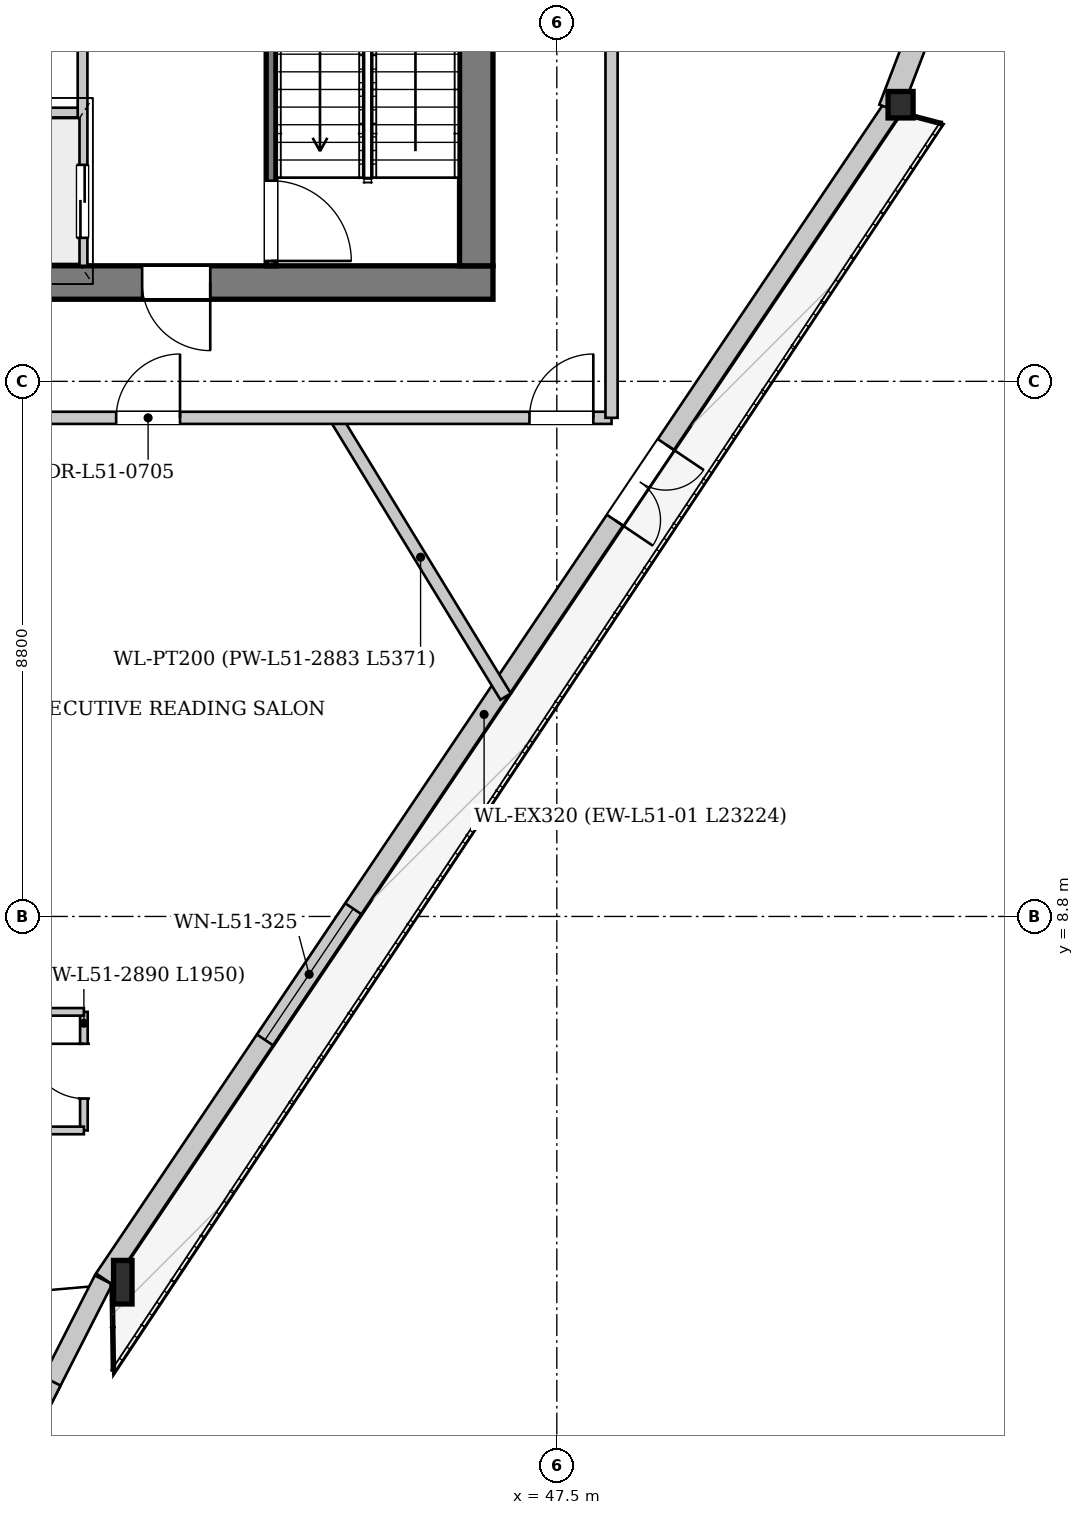
"""IFC4 building model, lengths in metres.
Left out: names, types, materials, properties, quantities, classifications, styles, units other than length and angle.
Written with IfcOpenShell. Run it as: python <this file> out.ifc"""

import sys

from ifc_helpers import new_model, si_unit, direction, frame, frame_2d, origin, origin_2d, place, context, subcontext, project, spatial, rectangle, i_section, extrude, source, transform, mapped, element, fill, save


model = new_model("IFC4")
c1 = context("Model", 3, precision=1e-05, world=origin(), true_north=direction((0.0, 1.0)))
c2 = subcontext(c1, "Body", "Model", "MODEL_VIEW")
j1 = project(units=[si_unit("LENGTHUNIT", "METRE"), si_unit("PLANEANGLEUNIT", "RADIAN")], contexts=[c1])
p1 = place(None, origin())
s1 = spatial("IfcSite", under=j1, at=p1, CompositionType="ELEMENT")
p2 = place(p1, origin())
s2 = spatial("IfcBuilding", under=s1, at=p2, CompositionType="ELEMENT")
p3 = place(p2, frame((0.0, 0.0, 192.75)))
s3 = spatial("IfcBuildingStorey", under=s2, at=p3, CompositionType="ELEMENT", Elevation=192.75)
m1 = source(origin(), c2, "Body", "SweptSolid", [
    extrude(i_section(OverallWidth=0.304, OverallDepth=0.716, WebThickness=0.021, FlangeThickness=0.04, at=origin_2d()), origin(), (0.0, 0.0, 1.0), 3.404),
])
p4 = place(p3, frame((40.186, 2.751, 0.0), z_axis=(0.10306941783, 0.020011390101, 0.994472844966), x_axis=(-0.190595380808, 0.981668681794, 0.0)))
e1 = element("IfcColumn", 1, at=p4, inside=s3, PredefinedType="COLUMN", context=c2, shape_type="MappedRepresentation", body=[
    mapped(m1, transform((0.0, 0.0, 0.0), x_axis=(1.0, 0.0, 0.0), y_axis=(0.0, 1.0, 0.0), z_axis=(0.0, 0.0, 1.0), scale=1.0)),
])
m2 = source(origin(), c2, "Body", "SweptSolid", [
    extrude(i_section(OverallWidth=0.412, OverallDepth=0.435, WebThickness=0.031, FlangeThickness=0.05, at=origin_2d()), origin(), (0.0, 0.0, 1.0), 3.396),
])
p5 = place(p3, frame((53.158, 22.014, 0.0), z_axis=(-0.002875831561, 0.079444846862, 0.9968351147), x_axis=(-0.999345455963, -0.036175401121, 0.0)))
e2 = element("IfcColumn", 2, at=p5, inside=s3, PredefinedType="COLUMN", context=c2, shape_type="MappedRepresentation", body=[
    mapped(m2, transform((0.0, 0.0, 0.0), x_axis=(1.0, 0.0, 0.0), y_axis=(0.0, 1.0, 0.0), z_axis=(0.0, 0.0, 1.0), scale=1.0)),
])
p6 = place(p3, frame((53.026, 22.104, 0.0), z_axis=(0.0, 0.0, 1.0), x_axis=(-0.558570859801, -0.829456806941, 0.0)))
e3 = element("IfcWall", 3, at=p6, inside=s3, PredefinedType="SOLIDWALL", context=c2, shape_type="SweptSolid", body=[
    extrude(rectangle(XDim=23.224, YDim=0.32, at=frame_2d((11.612, 0.0))), origin(), (0.0, 0.0, 1.0), 2.722),
])
p7 = place(p6, frame((6.682, 0.0, 0.0)))
e4 = element("IfcOpeningElement", 4, at=p7, cuts=e3, PredefinedType="OPENING", context=c2, shape_type="SweptSolid", body=[
    extrude(rectangle(XDim=1.5, YDim=2.3, at=frame_2d((0.75, 1.15))), frame((0.0, 0.17, 0.0), z_axis=(0.0, -1.0, 0.0), x_axis=(1.0, 0.0, 0.0)), (0.0, 0.0, 1.0), 0.34),
])
p8 = place(p6, frame((15.886, 0.0, 0.252)))
e5 = element("IfcOpeningElement", 5, at=p8, cuts=e3, PredefinedType="OPENING", context=c2, shape_type="SweptSolid", body=[
    extrude(rectangle(XDim=2.6, YDim=2.35, at=frame_2d((1.3, 1.175))), frame((0.0, 0.17, 0.0), z_axis=(0.0, -1.0, 0.0), x_axis=(1.0, 0.0, 0.0)), (0.0, 0.0, 1.0), 0.34),
])
p9 = place(p3, frame((40.044, 2.824, 0.0), z_axis=(0.0, 0.0, 1.0), x_axis=(-0.45371363181, -0.891147541269, 0.0)))
e6 = element("IfcWall", 6, at=p9, inside=s3, PredefinedType="SOLIDWALL", context=c2, shape_type="SweptSolid", body=[
    extrude(rectangle(XDim=2.189, YDim=0.32, at=frame_2d((1.095, 0.0))), origin(), (0.0, 0.0, 1.0), 2.722),
])
p10 = place(p3, frame((39.265, 0.943, 0.0), z_axis=(0.0, 0.0, 1.0), x_axis=(-0.891429905263, 0.453158607998, 0.0)))
e7 = element("IfcWall", 7, at=p10, inside=s3, PredefinedType="SOLIDWALL", context=c2, shape_type="SweptSolid", body=[
    extrude(rectangle(XDim=3.51, YDim=0.32, at=frame_2d((1.755, 0.0))), origin(), (0.0, 0.0, 1.0), 2.722),
])
p11 = place(p10, frame((0.805, 0.0, 0.302)))
e8 = element("IfcOpeningElement", 8, at=p11, cuts=e7, PredefinedType="OPENING", context=c2, shape_type="SweptSolid", body=[
    extrude(rectangle(XDim=1.5, YDim=2.3, at=frame_2d((0.75, 1.15))), frame((0.0, 0.17, 0.0), z_axis=(0.0, -1.0, 0.0), x_axis=(1.0, 0.0, 0.0)), (0.0, 0.0, 1.0), 0.34),
])
p12 = place(p3, frame((61.283, 43.772, 0.0), z_axis=(0.0, 0.0, 1.0), x_axis=(-0.357452785868, -0.933931210462, 0.0)))
e9 = element("IfcWall", 9, at=p12, inside=s3, PredefinedType="SOLIDWALL", context=c2, shape_type="SweptSolid", body=[
    extrude(rectangle(XDim=23.224, YDim=0.38, at=frame_2d((11.612, 0.0))), origin(), (0.0, 0.0, 1.0), 2.722),
])
p13 = place(p12, frame((5.403, 0.0, 0.352)))
e10 = element("IfcOpeningElement", 10, at=p13, cuts=e9, PredefinedType="OPENING", context=c2, shape_type="SweptSolid", body=[
    extrude(rectangle(XDim=2.2, YDim=2.25, at=frame_2d((1.1, 1.125))), frame((0.0, 0.2, 0.0), z_axis=(0.0, -1.0, 0.0), x_axis=(1.0, 0.0, 0.0)), (0.0, 0.0, 1.0), 0.4),
])
p14 = place(p12, frame((15.621, 0.0, 0.352)))
e11 = element("IfcOpeningElement", 11, at=p14, cuts=e9, PredefinedType="OPENING", context=c2, shape_type="SweptSolid", body=[
    extrude(rectangle(XDim=2.2, YDim=2.25, at=frame_2d((1.1, 1.125))), frame((0.0, 0.2, 0.0), z_axis=(0.0, -1.0, 0.0), x_axis=(1.0, 0.0, 0.0)), (0.0, 0.0, 1.0), 0.4),
])
p15 = place(p3, frame((46.45, 19.225, 0.0), z_axis=(0.0, 0.0, 1.0), x_axis=(-1.0, 0.0, 0.0)))
e12 = element("IfcWall", 12, at=p15, inside=s3, PredefinedType="SHEAR", context=c2, shape_type="SweptSolid", body=[
    extrude(rectangle(XDim=16.9, YDim=0.55, at=frame_2d((8.45, 0.0))), origin(), (0.0, 0.0, 1.0), 3.33),
])
p16 = place(p15, frame((4.65, 0.0, 0.0)))
e13 = element("IfcOpeningElement", 13, at=p16, cuts=e12, PredefinedType="OPENING", context=c2, shape_type="SweptSolid", body=[
    extrude(rectangle(XDim=1.12, YDim=2.25, at=frame_2d((0.56, 1.125))), frame((0.0, 0.285, 0.0), z_axis=(0.0, -1.0, 0.0), x_axis=(1.0, 0.0, 0.0)), (0.0, 0.0, 1.0), 0.57),
])
p17 = place(p15, frame((11.15, 0.0, 0.0)))
e14 = element("IfcOpeningElement", 14, at=p17, cuts=e12, PredefinedType="OPENING", context=c2, shape_type="SweptSolid", body=[
    extrude(rectangle(XDim=1.12, YDim=2.25, at=frame_2d((0.56, 1.125))), frame((0.0, 0.285, 0.0), z_axis=(0.0, -1.0, 0.0), x_axis=(1.0, 0.0, 0.0)), (0.0, 0.0, 1.0), 0.57),
])
p18 = place(p3, frame((46.175, 33.7, 0.0), z_axis=(0.0, 0.0, 1.0), x_axis=(0.0, -1.0, 0.0)))
e15 = element("IfcWall", 15, at=p18, inside=s3, PredefinedType="SHEAR", context=c2, shape_type="SweptSolid", body=[
    extrude(rectangle(XDim=14.2, YDim=0.55, at=frame_2d((7.1, 0.0))), origin(), (0.0, 0.0, 1.0), 3.33),
])
p19 = place(p18, frame((5.18, 0.0, 0.0)))
e16 = element("IfcOpeningElement", 16, at=p19, cuts=e15, PredefinedType="OPENING", context=c2, shape_type="SweptSolid", body=[
    extrude(rectangle(XDim=1.6, YDim=2.2, at=frame_2d((0.8, 1.1))), frame((0.0, 0.285, 0.0), z_axis=(0.0, -1.0, 0.0), x_axis=(1.0, 0.0, 0.0)), (0.0, 0.0, 1.0), 0.57),
])
p20 = place(p18, frame((2.05, 0.0, 0.0)))
e17 = element("IfcOpeningElement", 17, at=p20, cuts=e15, PredefinedType="OPENING", context=c2, shape_type="SweptSolid", body=[
    extrude(rectangle(XDim=0.95, YDim=2.1, at=frame_2d((0.475, 1.05))), frame((0.0, 0.285, 0.0), z_axis=(0.0, -1.0, 0.0), x_axis=(1.0, 0.0, 0.0)), (0.0, 0.0, 1.0), 0.57),
])
p21 = place(p3, frame((42.8, 26.96, 0.0), z_axis=(0.0, 0.0, 1.0), x_axis=(0.0, -1.0, 0.0)))
e18 = element("IfcWall", 18, at=p21, inside=s3, PredefinedType="PARTITIONING", context=c2, shape_type="SweptSolid", body=[
    extrude(rectangle(XDim=7.46, YDim=0.16, at=frame_2d((3.73, 0.0))), origin(), (0.0, 0.0, 1.0), 3.33),
])
p22 = place(p21, frame((6.06, 0.0, 0.0)))
e19 = element("IfcOpeningElement", 19, at=p22, cuts=e18, PredefinedType="OPENING", context=c2, shape_type="SweptSolid", body=[
    extrude(rectangle(XDim=1.32, YDim=2.2, at=frame_2d((0.66, 1.1))), frame((0.0, 0.09, 0.0), z_axis=(0.0, -1.0, 0.0), x_axis=(1.0, 0.0, 0.0)), (0.0, 0.0, 1.0), 0.18),
])
p23 = place(p3, frame((39.7, 24.28, 0.0), z_axis=(0.0, 0.0, 1.0), x_axis=(0.0, -1.0, 0.0)))
e20 = element("IfcWall", 20, at=p23, inside=s3, PredefinedType="PARTITIONING", context=c2, shape_type="SweptSolid", body=[
    extrude(rectangle(XDim=4.78, YDim=0.16, at=frame_2d((2.39, 0.0))), origin(), (0.0, 0.0, 1.0), 3.33),
])
p24 = place(p23, frame((3.12, 0.0, 0.0)))
e21 = element("IfcOpeningElement", 21, at=p24, cuts=e20, PredefinedType="OPENING", context=c2, shape_type="SweptSolid", body=[
    extrude(rectangle(XDim=1.2, YDim=2.2, at=frame_2d((0.6, 1.1))), frame((0.0, 0.09, 0.0), z_axis=(0.0, -1.0, 0.0), x_axis=(1.0, 0.0, 0.0)), (0.0, 0.0, 1.0), 0.18),
])
p25 = place(p3, frame((36.38, 22.02, 0.0), z_axis=(0.0, 0.0, 1.0), x_axis=(1.0, 0.0, 0.0)))
e22 = element("IfcWall", 22, at=p25, inside=s3, PredefinedType="PARTITIONING", context=c2, shape_type="SweptSolid", body=[
    extrude(rectangle(XDim=3.24, YDim=0.16, at=frame_2d((1.62, 0.0))), origin(), (0.0, 0.0, 1.0), 3.33),
])
p26 = place(p3, frame((43.86, 17.0, 0.0), z_axis=(0.0, 0.0, 1.0), x_axis=(0.521004990477, -0.853553630359, 0.0)))
e23 = element("IfcWall", 23, at=p26, inside=s3, PredefinedType="PARTITIONING", context=c2, shape_type="SweptSolid", body=[
    extrude(rectangle(XDim=5.371, YDim=0.2, at=frame_2d((2.686, 0.0))), origin(), (0.0, 0.0, 1.0), 3.33),
])
p27 = place(p3, frame((39.722, 5.281, 0.0), z_axis=(0.0, 0.0, 1.0), x_axis=(0.0, 1.0, 0.0)))
e24 = element("IfcWall", 24, at=p27, inside=s3, PredefinedType="PARTITIONING", context=c2, shape_type="SweptSolid", body=[
    extrude(rectangle(XDim=1.95, YDim=0.125, at=frame_2d((0.975, 0.0))), origin(), (0.0, 0.0, 1.0), 3.33),
])
p28 = place(p27, frame((0.525, 0.0, 0.0)))
e25 = element("IfcOpeningElement", 25, at=p28, cuts=e24, PredefinedType="OPENING", context=c2, shape_type="SweptSolid", body=[
    extrude(rectangle(XDim=0.9, YDim=2.1, at=frame_2d((0.45, 1.05))), frame((0.0, 0.073, 0.0), z_axis=(0.0, -1.0, 0.0), x_axis=(1.0, 0.0, 0.0)), (0.0, 0.0, 1.0), 0.145),
])
for number, where, z_axis, x_axis in (
    (26, (39.722, 7.231, 0.0), (0.0, 0.0, 1.0), (-1.0, 0.0, 0.0)),
    (27, (37.322, 5.281, 0.0), (0.0, 0.0, 1.0), (1.0, 0.0, 0.0)),
):
    element("IfcWall", number, at=place(p3, frame(where, z_axis=z_axis, x_axis=x_axis)), inside=s3, PredefinedType="PARTITIONING", context=c2, shape_type="SweptSolid", body=[
        extrude(rectangle(XDim=2.4, YDim=0.125, at=frame_2d((1.2, 0.0))), origin(), (0.0, 0.0, 1.0), 3.33),
    ])
p29 = place(p3, frame((27.6, 17.0, 0.0), z_axis=(0.0, 0.0, 1.0), x_axis=(1.0, 0.0, 0.0)))
e28 = element("IfcWall", 28, at=p29, inside=s3, PredefinedType="PARTITIONING", context=c2, shape_type="SweptSolid", body=[
    extrude(rectangle(XDim=20.8, YDim=0.2, at=frame_2d((10.4, 0.0))), origin(), (0.0, 0.0, 1.0), 3.33),
])
p30 = place(p29, frame((19.45, 0.0, 0.0)))
e29 = element("IfcOpeningElement", 29, at=p30, cuts=e28, PredefinedType="OPENING", context=c2, shape_type="SweptSolid", body=[
    extrude(rectangle(XDim=1.05, YDim=2.2, at=frame_2d((0.525, 1.1))), frame((0.0, 0.11, 0.0), z_axis=(0.0, -1.0, 0.0), x_axis=(1.0, 0.0, 0.0)), (0.0, 0.0, 1.0), 0.22),
])
p31 = place(p29, frame((5.239, 0.0, 0.0)))
e30 = element("IfcOpeningElement", 30, at=p31, cuts=e28, PredefinedType="OPENING", context=c2, shape_type="SweptSolid", body=[
    extrude(rectangle(XDim=1.05, YDim=2.2, at=frame_2d((0.525, 1.1))), frame((0.0, 0.11, 0.0), z_axis=(0.0, -1.0, 0.0), x_axis=(1.0, 0.0, 0.0)), (0.0, 0.0, 1.0), 0.22),
])
p32 = place(p29, frame((12.653, 0.0, 0.0)))
e31 = element("IfcOpeningElement", 31, at=p32, cuts=e28, PredefinedType="OPENING", context=c2, shape_type="SweptSolid", body=[
    extrude(rectangle(XDim=1.05, YDim=2.2, at=frame_2d((0.525, 1.1))), frame((0.0, 0.11, 0.0), z_axis=(0.0, -1.0, 0.0), x_axis=(1.0, 0.0, 0.0)), (0.0, 0.0, 1.0), 0.22),
])
p33 = place(p3, frame((48.4, 17.0, 0.0), z_axis=(0.0, 0.0, 1.0), x_axis=(0.0, 1.0, 0.0)))
e32 = element("IfcWall", 32, at=p33, inside=s3, PredefinedType="PARTITIONING", context=c2, shape_type="SweptSolid", body=[
    extrude(rectangle(XDim=19.2, YDim=0.2, at=frame_2d((9.6, 0.0))), origin(), (0.0, 0.0, 1.0), 3.33),
])
m3 = source(origin(), c2, "Body", "SweptSolid", [
    extrude(rectangle(XDim=1.5, YDim=2.3, at=frame_2d((0.75, 1.15))), frame((0.0, 0.025, 0.0), z_axis=(0.0, -1.0, 0.0), x_axis=(1.0, 0.0, 0.0)), (0.0, 0.0, 1.0), 0.05),
])
p34 = place(p7, origin())
e33 = element("IfcDoor", 33, at=p34, inside=s3, OperationType="DOUBLE_DOOR_SINGLE_SWING", PredefinedType="DOOR", context=c2, shape_type="MappedRepresentation", body=[
    mapped(m3, transform((0.0, 0.0, 0.0), x_axis=(1.0, 0.0, 0.0), y_axis=(0.0, 1.0, 0.0), z_axis=(0.0, 0.0, 1.0), scale=1.0)),
])
fill(e4, e33)
m4 = source(origin(), c2, "Body", "SweptSolid", [
    extrude(rectangle(XDim=2.6, YDim=2.35, at=frame_2d((1.3, 1.175))), frame((0.0, 0.03, 0.0), z_axis=(0.0, -1.0, 0.0), x_axis=(1.0, 0.0, 0.0)), (0.0, 0.0, 1.0), 0.06),
])
p35 = place(p8, origin())
e34 = element("IfcWindow", 34, at=p35, inside=s3, PartitioningType="SINGLE_PANEL", PredefinedType="WINDOW", context=c2, shape_type="MappedRepresentation", body=[
    mapped(m4, transform((0.0, 0.0, 0.0), x_axis=(1.0, 0.0, 0.0), y_axis=(0.0, 1.0, 0.0), z_axis=(0.0, 0.0, 1.0), scale=1.0)),
])
fill(e5, e34)
m5 = source(origin(), c2, "Body", "SweptSolid", [
    extrude(rectangle(XDim=1.12, YDim=2.25, at=frame_2d((0.56, 1.125))), frame((0.0, 0.025, 0.0), z_axis=(0.0, -1.0, 0.0), x_axis=(1.0, 0.0, 0.0)), (0.0, 0.0, 1.0), 0.05),
])
p36 = place(p16, origin())
e35 = element("IfcDoor", 35, at=p36, inside=s3, OperationType="SINGLE_SWING_LEFT", PredefinedType="DOOR", context=c2, shape_type="MappedRepresentation", body=[
    mapped(m5, transform((0.0, 0.0, 0.0), x_axis=(1.0, 0.0, 0.0), y_axis=(0.0, 1.0, 0.0), z_axis=(0.0, 0.0, 1.0), scale=1.0)),
])
fill(e13, e35)
m6 = source(origin(), c2, "Body", "SweptSolid", [
    extrude(rectangle(XDim=1.32, YDim=2.2, at=frame_2d((0.66, 1.1))), frame((0.0, 0.025, 0.0), z_axis=(0.0, -1.0, 0.0), x_axis=(1.0, 0.0, 0.0)), (0.0, 0.0, 1.0), 0.05),
])
p37 = place(p22, origin())
e36 = element("IfcDoor", 36, at=p37, inside=s3, OperationType="SINGLE_SWING_RIGHT", PredefinedType="DOOR", context=c2, shape_type="MappedRepresentation", body=[
    mapped(m6, transform((0.0, 0.0, 0.0), x_axis=(1.0, 0.0, 0.0), y_axis=(0.0, 1.0, 0.0), z_axis=(0.0, 0.0, 1.0), scale=1.0)),
])
fill(e19, e36)
m7 = source(origin(), c2, "Body", "SweptSolid", [
    extrude(rectangle(XDim=1.2, YDim=2.2, at=frame_2d((0.6, 1.1))), frame((0.0, 0.025, 0.0), z_axis=(0.0, -1.0, 0.0), x_axis=(1.0, 0.0, 0.0)), (0.0, 0.0, 1.0), 0.05),
])
p38 = place(p24, origin())
e37 = element("IfcDoor", 37, at=p38, inside=s3, OperationType="DOUBLE_DOOR_SLIDING", PredefinedType="DOOR", context=c2, shape_type="MappedRepresentation", body=[
    mapped(m7, transform((0.0, 0.0, 0.0), x_axis=(1.0, 0.0, 0.0), y_axis=(0.0, 1.0, 0.0), z_axis=(0.0, 0.0, 1.0), scale=1.0)),
])
fill(e21, e37)
m8 = source(origin(), c2, "Body", "SweptSolid", [
    extrude(rectangle(XDim=0.9, YDim=2.1, at=frame_2d((0.45, 1.05))), frame((0.0, 0.025, 0.0), z_axis=(0.0, -1.0, 0.0), x_axis=(1.0, 0.0, 0.0)), (0.0, 0.0, 1.0), 0.05),
])
p39 = place(p28, origin())
e38 = element("IfcDoor", 38, at=p39, inside=s3, OperationType="SINGLE_SWING_RIGHT", PredefinedType="DOOR", context=c2, shape_type="MappedRepresentation", body=[
    mapped(m8, transform((0.0, 0.0, 0.0), x_axis=(1.0, 0.0, 0.0), y_axis=(0.0, 1.0, 0.0), z_axis=(0.0, 0.0, 1.0), scale=1.0)),
])
fill(e25, e38)
m9 = source(origin(), c2, "Body", "SweptSolid", [
    extrude(rectangle(XDim=1.05, YDim=2.2, at=frame_2d((0.525, 1.1))), frame((0.0, 0.025, 0.0), z_axis=(0.0, -1.0, 0.0), x_axis=(1.0, 0.0, 0.0)), (0.0, 0.0, 1.0), 0.05),
])
p40 = place(p30, origin())
e39 = element("IfcDoor", 39, at=p40, inside=s3, OperationType="SINGLE_SWING_RIGHT", PredefinedType="DOOR", context=c2, shape_type="MappedRepresentation", body=[
    mapped(m9, transform((0.0, 0.0, 0.0), x_axis=(1.0, 0.0, 0.0), y_axis=(0.0, 1.0, 0.0), z_axis=(0.0, 0.0, 1.0), scale=1.0)),
])
fill(e29, e39)
p41 = place(p32, origin())
e40 = element("IfcDoor", 40, at=p41, inside=s3, OperationType="SINGLE_SWING_RIGHT", PredefinedType="DOOR", context=c2, shape_type="MappedRepresentation", body=[
    mapped(m9, transform((0.0, 0.0, 0.0), x_axis=(1.0, 0.0, 0.0), y_axis=(0.0, 1.0, 0.0), z_axis=(0.0, 0.0, 1.0), scale=1.0)),
])
fill(e31, e40)
save(model, sys.argv[1])
